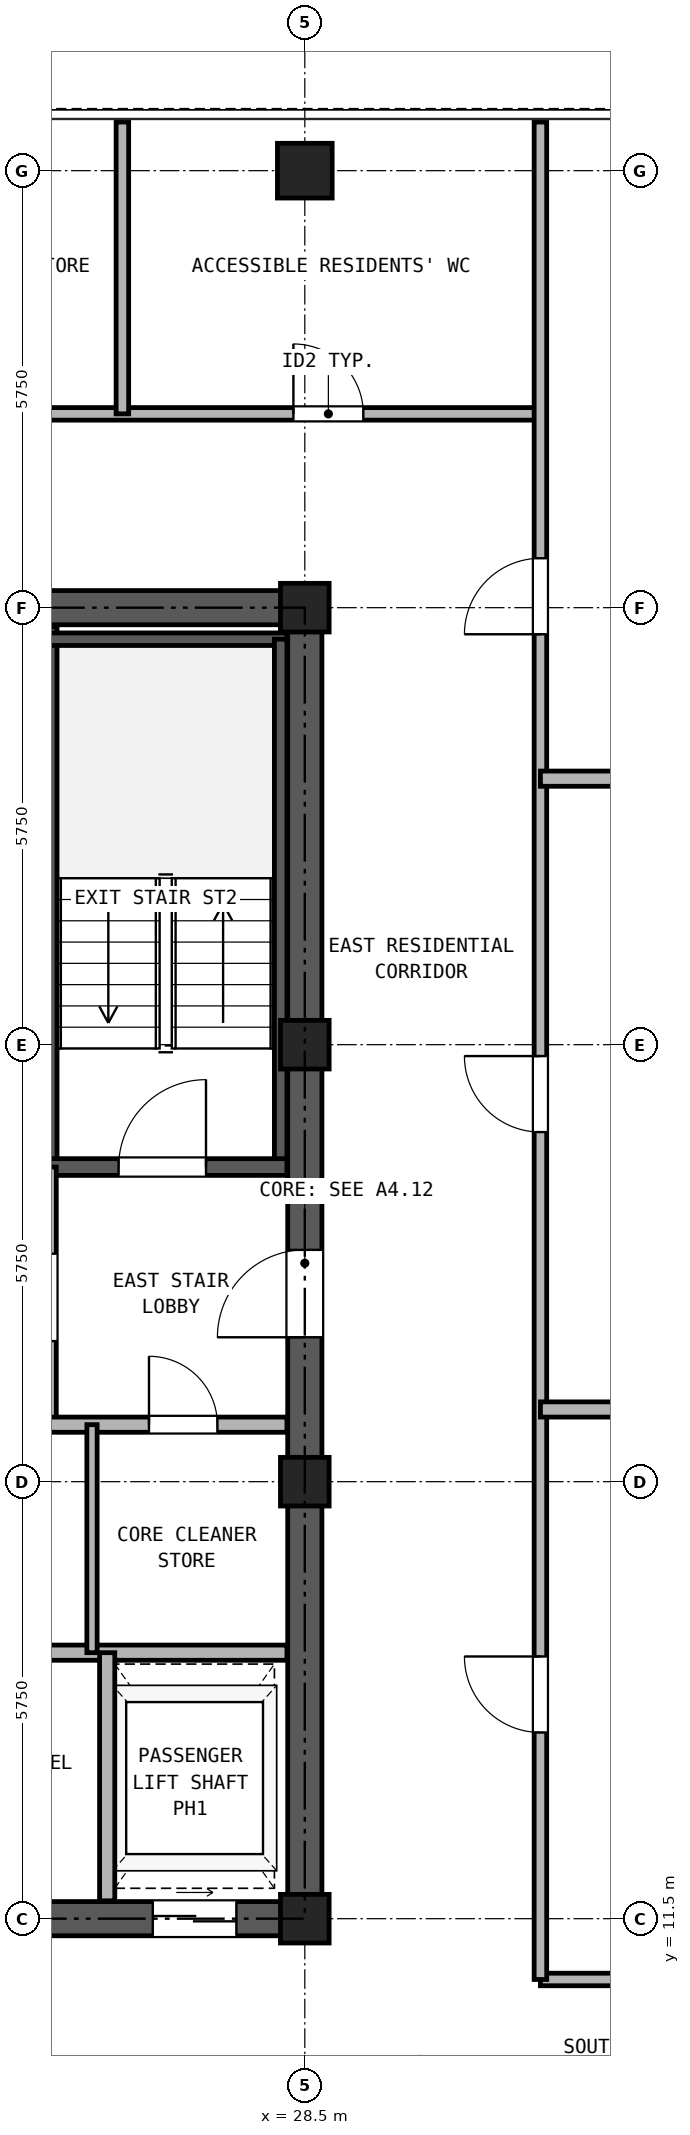
"""IFC4 building model, lengths in metres.
Left out: names, types, materials, properties, quantities, classifications, styles, units other than length and angle.
Written with IfcOpenShell. Run it as: python <this file> out.ifc"""

import sys

from ifc_helpers import new_model, si_unit, direction, frame, frame_2d, origin, origin_2d, place, context, subcontext, project, spatial, rectangle, hollow_rectangle, extrude, source, transform, mapped, element, fill, save


model = new_model("IFC4")
c1 = context("Model", 3, precision=1e-05, world=origin(), true_north=direction((0.0, 1.0)))
c2 = subcontext(c1, "Body", "Model", "MODEL_VIEW")
j1 = project(units=[si_unit("LENGTHUNIT", "METRE"), si_unit("PLANEANGLEUNIT", "RADIAN")], contexts=[c1])
p1 = place(None, origin())
s1 = spatial("IfcSite", under=j1, at=p1, CompositionType="ELEMENT")
p2 = place(p1, origin())
s2 = spatial("IfcBuilding", under=s1, at=p2, CompositionType="ELEMENT")
p3 = place(p2, frame((0.0, 0.0, 175.3)))
s3 = spatial("IfcBuildingStorey", under=s2, at=p3, CompositionType="ELEMENT", Elevation=175.3)
m1 = source(origin(), c2, "Body", "SweptSolid", [
    extrude(hollow_rectangle(XDim=0.72, YDim=0.72, WallThickness=0.04, at=origin_2d()), origin(), (0.0, 0.0, 1.0), 2.95),
])
p4 = place(p3, frame((28.5, 34.5, 0.0), z_axis=(0.0, 0.0, 1.0), x_axis=(1.0, 0.0, 0.0)))
e1 = element("IfcColumn", 1, at=p4, inside=s3, PredefinedType="COLUMN", context=c2, shape_type="MappedRepresentation", body=[
    mapped(m1, transform((0.0, 0.0, 0.0), x_axis=(1.0, 0.0, 0.0), y_axis=(0.0, 1.0, 0.0), z_axis=(0.0, 0.0, 1.0), scale=1.0)),
])
m2 = source(origin(), c2, "Body", "SweptSolid", [
    extrude(hollow_rectangle(XDim=0.64, YDim=0.64, WallThickness=0.035, at=origin_2d()), origin(), (0.0, 0.0, 1.0), 2.95),
])
for number, where, z_axis, x_axis in (
    (2, (28.5, 11.5, 0.0), (0.0, 0.0, 1.0), (1.0, 0.0, 0.0)),
    (3, (28.5, 17.25, 0.0), (0.0, 0.0, 1.0), (1.0, 0.0, 0.0)),
    (4, (28.5, 23.0, 0.0), (0.0, 0.0, 1.0), (1.0, 0.0, 0.0)),
    (5, (28.5, 28.75, 0.0), (0.0, 0.0, 1.0), (1.0, 0.0, 0.0)),
):
    element("IfcColumn", number, at=place(p3, frame(where, z_axis=z_axis, x_axis=x_axis)), inside=s3, PredefinedType="COLUMN", context=c2, shape_type="MappedRepresentation", body=[
        mapped(m2, transform((0.0, 0.0, 0.0), x_axis=(1.0, 0.0, 0.0), y_axis=(0.0, 1.0, 0.0), z_axis=(0.0, 0.0, 1.0), scale=1.0)),
    ])
p5 = place(p3, frame((18.275, 11.5, 0.0), z_axis=(0.0, 0.0, 1.0), x_axis=(1.0, 0.0, 0.0)))
e6 = element("IfcWall", 6, at=p5, inside=s3, PredefinedType="SHEAR", context=c2, shape_type="SweptSolid", body=[
    extrude(rectangle(XDim=10.45, YDim=0.45, at=frame_2d((5.225, 0.0))), origin(), (0.0, 0.0, 1.0), 2.95),
])
p6 = place(p5, frame((1.825, 0.0, 0.0)))
e7 = element("IfcOpeningElement", 7, at=p6, cuts=e6, PredefinedType="OPENING", context=c2, shape_type="SweptSolid", body=[
    extrude(rectangle(XDim=0.95, YDim=2.15, at=frame_2d((0.475, 1.075))), frame((0.0, 0.235, 0.0), z_axis=(0.0, -1.0, 0.0), x_axis=(1.0, 0.0, 0.0)), (0.0, 0.0, 1.0), 0.47),
])
p7 = place(p5, frame((5.325, 0.0, 0.0)))
e8 = element("IfcOpeningElement", 8, at=p7, cuts=e6, PredefinedType="OPENING", context=c2, shape_type="SweptSolid", body=[
    extrude(rectangle(XDim=0.95, YDim=2.15, at=frame_2d((0.475, 1.075))), frame((0.0, 0.235, 0.0), z_axis=(0.0, -1.0, 0.0), x_axis=(1.0, 0.0, 0.0)), (0.0, 0.0, 1.0), 0.47),
])
p8 = place(p5, frame((8.225, 0.0, 0.0)))
e9 = element("IfcOpeningElement", 9, at=p8, cuts=e6, PredefinedType="OPENING", context=c2, shape_type="SweptSolid", body=[
    extrude(rectangle(XDim=1.1, YDim=2.25, at=frame_2d((0.55, 1.125))), frame((0.0, 0.235, 0.0), z_axis=(0.0, -1.0, 0.0), x_axis=(1.0, 0.0, 0.0)), (0.0, 0.0, 1.0), 0.47),
])
p9 = place(p3, frame((18.275, 28.75, 0.0), z_axis=(0.0, 0.0, 1.0), x_axis=(1.0, 0.0, 0.0)))
e10 = element("IfcWall", 10, at=p9, inside=s3, PredefinedType="SHEAR", context=c2, shape_type="SweptSolid", body=[
    extrude(rectangle(XDim=10.45, YDim=0.45, at=frame_2d((5.225, 0.0))), origin(), (0.0, 0.0, 1.0), 2.95),
])
p10 = place(p9, frame((4.105, 0.0, 0.0)))
e11 = element("IfcOpeningElement", 11, at=p10, cuts=e10, PredefinedType="OPENING", context=c2, shape_type="SweptSolid", body=[
    extrude(rectangle(XDim=0.9, YDim=2.05, at=frame_2d((0.45, 1.025))), frame((0.0, 0.235, 0.0), z_axis=(0.0, -1.0, 0.0), x_axis=(1.0, 0.0, 0.0)), (0.0, 0.0, 1.0), 0.47),
])
p11 = place(p9, frame((5.645, 0.0, 0.0)))
e12 = element("IfcOpeningElement", 12, at=p11, cuts=e10, PredefinedType="OPENING", context=c2, shape_type="SweptSolid", body=[
    extrude(rectangle(XDim=0.9, YDim=2.05, at=frame_2d((0.45, 1.025))), frame((0.0, 0.235, 0.0), z_axis=(0.0, -1.0, 0.0), x_axis=(1.0, 0.0, 0.0)), (0.0, 0.0, 1.0), 0.47),
])
p12 = place(p3, frame((28.5, 11.725, 0.0), z_axis=(0.0, 0.0, 1.0), x_axis=(0.0, 1.0, 0.0)))
e13 = element("IfcWall", 13, at=p12, inside=s3, PredefinedType="SHEAR", context=c2, shape_type="SweptSolid", body=[
    extrude(rectangle(XDim=16.8, YDim=0.45, at=frame_2d((8.4, 0.0))), origin(), (0.0, 0.0, 1.0), 2.95),
])
p13 = place(p12, frame((7.425, 0.0, 0.0)))
e14 = element("IfcOpeningElement", 14, at=p13, cuts=e13, PredefinedType="OPENING", context=c2, shape_type="SweptSolid", body=[
    extrude(rectangle(XDim=1.15, YDim=2.2, at=frame_2d((0.575, 1.1))), frame((0.0, 0.235, 0.0), z_axis=(0.0, -1.0, 0.0), x_axis=(1.0, 0.0, 0.0)), (0.0, 0.0, 1.0), 0.47),
])
p14 = place(p3, frame((25.13, 21.39, 0.0), z_axis=(0.0, 0.0, 1.0), x_axis=(0.0, 1.0, 0.0)))
e15 = element("IfcWall", 15, at=p14, inside=s3, PredefinedType="SOLIDWALL", context=c2, shape_type="SweptSolid", body=[
    extrude(rectangle(XDim=7.11, YDim=0.22, at=frame_2d((3.555, 0.0))), origin(), (0.0, 0.0, 1.0), 2.95),
])
p15 = place(p3, frame((25.13, 28.335, 0.0), z_axis=(0.0, 0.0, 1.0), x_axis=(1.0, 0.0, 0.0)))
e16 = element("IfcWall", 16, at=p15, inside=s3, PredefinedType="PARTITIONING", context=c2, shape_type="SweptSolid", body=[
    extrude(rectangle(XDim=3.135, YDim=0.165, at=frame_2d((1.567, 0.0))), origin(), (0.0, 0.0, 1.0), 2.95),
])
p16 = place(p3, frame((28.183, 21.39, 0.0), z_axis=(0.0, 0.0, 1.0), x_axis=(0.0, 1.0, 0.0)))
e17 = element("IfcWall", 17, at=p16, inside=s3, PredefinedType="PARTITIONING", context=c2, shape_type="SweptSolid", body=[
    extrude(rectangle(XDim=6.945, YDim=0.165, at=frame_2d((3.473, 0.0))), origin(), (0.0, 0.0, 1.0), 2.95),
])
p17 = place(p3, frame((25.13, 21.39, 0.0), z_axis=(0.0, 0.0, 1.0), x_axis=(1.0, 0.0, 0.0)))
e18 = element("IfcWall", 18, at=p17, inside=s3, PredefinedType="SOLIDWALL", context=c2, shape_type="SweptSolid", body=[
    extrude(rectangle(XDim=3.135, YDim=0.22, at=frame_2d((1.567, 0.0))), origin(), (0.0, 0.0, 1.0), 2.95),
])
p18 = place(p17, frame((0.92, 0.0, 0.0)))
e19 = element("IfcOpeningElement", 19, at=p18, cuts=e18, PredefinedType="OPENING", context=c2, shape_type="SweptSolid", body=[
    extrude(rectangle(XDim=1.15, YDim=2.2, at=frame_2d((0.575, 1.1))), frame((0.0, 0.12, 0.0), z_axis=(0.0, -1.0, 0.0), x_axis=(1.0, 0.0, 0.0)), (0.0, 0.0, 1.0), 0.24),
])
p19 = place(p3, frame((25.13, 18.0, 0.0), z_axis=(0.0, 0.0, 1.0), x_axis=(0.0, 1.0, 0.0)))
e20 = element("IfcWall", 20, at=p19, inside=s3, PredefinedType="PARTITIONING", context=c2, shape_type="SweptSolid", body=[
    extrude(rectangle(XDim=3.39, YDim=0.2, at=frame_2d((1.695, 0.0))), origin(), (0.0, 0.0, 1.0), 2.95),
])
p20 = place(p19, frame((1.1, 0.0, 0.0)))
e21 = element("IfcOpeningElement", 21, at=p20, cuts=e20, PredefinedType="OPENING", context=c2, shape_type="SweptSolid", body=[
    extrude(rectangle(XDim=1.15, YDim=2.2, at=frame_2d((0.575, 1.1))), frame((0.0, 0.11, 0.0), z_axis=(0.0, -1.0, 0.0), x_axis=(1.0, 0.0, 0.0)), (0.0, 0.0, 1.0), 0.22),
])
p21 = place(p3, frame((18.735, 18.0, 0.0), z_axis=(0.0, 0.0, 1.0), x_axis=(1.0, 0.0, 0.0)))
e22 = element("IfcWall", 22, at=p21, inside=s3, PredefinedType="PARTITIONING", context=c2, shape_type="SweptSolid", body=[
    extrude(rectangle(XDim=9.53, YDim=0.2, at=frame_2d((4.765, 0.0))), origin(), (0.0, 0.0, 1.0), 2.95),
])
p22 = place(p21, frame((0.515, 0.0, 0.0)))
e23 = element("IfcOpeningElement", 23, at=p22, cuts=e22, PredefinedType="OPENING", context=c2, shape_type="SweptSolid", body=[
    extrude(rectangle(XDim=1.3, YDim=2.3, at=frame_2d((0.65, 1.15))), frame((0.0, 0.11, 0.0), z_axis=(0.0, -1.0, 0.0), x_axis=(1.0, 0.0, 0.0)), (0.0, 0.0, 1.0), 0.22),
])
p23 = place(p21, frame((2.615, 0.0, 0.0)))
e24 = element("IfcOpeningElement", 24, at=p23, cuts=e22, PredefinedType="OPENING", context=c2, shape_type="SweptSolid", body=[
    extrude(rectangle(XDim=1.3, YDim=2.3, at=frame_2d((0.65, 1.15))), frame((0.0, 0.11, 0.0), z_axis=(0.0, -1.0, 0.0), x_axis=(1.0, 0.0, 0.0)), (0.0, 0.0, 1.0), 0.22),
])
p24 = place(p21, frame((5.015, 0.0, 0.0)))
e25 = element("IfcOpeningElement", 25, at=p24, cuts=e22, PredefinedType="OPENING", context=c2, shape_type="SweptSolid", body=[
    extrude(rectangle(XDim=0.9, YDim=2.05, at=frame_2d((0.45, 1.025))), frame((0.0, 0.11, 0.0), z_axis=(0.0, -1.0, 0.0), x_axis=(1.0, 0.0, 0.0)), (0.0, 0.0, 1.0), 0.22),
])
p25 = place(p21, frame((7.715, 0.0, 0.0)))
e26 = element("IfcOpeningElement", 26, at=p25, cuts=e22, PredefinedType="OPENING", context=c2, shape_type="SweptSolid", body=[
    extrude(rectangle(XDim=0.9, YDim=2.05, at=frame_2d((0.45, 1.025))), frame((0.0, 0.11, 0.0), z_axis=(0.0, -1.0, 0.0), x_axis=(1.0, 0.0, 0.0)), (0.0, 0.0, 1.0), 0.22),
])
p26 = place(p3, frame((18.735, 15.0, 0.0), z_axis=(0.0, 0.0, 1.0), x_axis=(1.0, 0.0, 0.0)))
e27 = element("IfcWall", 27, at=p26, inside=s3, PredefinedType="PARTITIONING", context=c2, shape_type="SweptSolid", body=[
    extrude(rectangle(XDim=9.53, YDim=0.2, at=frame_2d((4.765, 0.0))), origin(), (0.0, 0.0, 1.0), 2.95),
])
p27 = place(p3, frame((25.7, 15.0, 0.0), z_axis=(0.0, 0.0, 1.0), x_axis=(0.0, 1.0, 0.0)))
e28 = element("IfcWall", 28, at=p27, inside=s3, PredefinedType="PARTITIONING", context=c2, shape_type="SweptSolid", body=[
    extrude(rectangle(XDim=3.0, YDim=0.135, at=frame_2d((1.5, 0.0))), origin(), (0.0, 0.0, 1.0), 2.95),
])
p28 = place(p3, frame((25.9, 11.735, 0.0), z_axis=(0.0, 0.0, 1.0), x_axis=(0.0, 1.0, 0.0)))
e29 = element("IfcWall", 29, at=p28, inside=s3, PredefinedType="PARTITIONING", context=c2, shape_type="SweptSolid", body=[
    extrude(rectangle(XDim=3.265, YDim=0.2, at=frame_2d((1.632, 0.0))), origin(), (0.0, 0.0, 1.0), 2.95),
])
p29 = place(p3, frame((31.6, 10.7, 0.0), z_axis=(0.0, 0.0, 1.0), x_axis=(1.0, 0.0, 0.0)))
e30 = element("IfcWall", 30, at=p29, inside=s3, PredefinedType="PARTITIONING", context=c2, shape_type="SweptSolid", body=[
    extrude(rectangle(XDim=6.6, YDim=0.165, at=frame_2d((3.3, 0.0))), origin(), (0.0, 0.0, 1.0), 2.95),
])
p30 = place(p3, frame((15.4, 31.3, 0.0), z_axis=(0.0, 0.0, 1.0), x_axis=(1.0, 0.0, 0.0)))
e31 = element("IfcWall", 31, at=p30, inside=s3, PredefinedType="PARTITIONING", context=c2, shape_type="SweptSolid", body=[
    extrude(rectangle(XDim=16.2, YDim=0.165, at=frame_2d((8.1, 0.0))), origin(), (0.0, 0.0, 1.0), 2.95),
])
p31 = place(p30, frame((2.8, 0.0, 0.0)))
e32 = element("IfcOpeningElement", 32, at=p31, cuts=e31, PredefinedType="OPENING", context=c2, shape_type="SweptSolid", body=[
    extrude(rectangle(XDim=0.95, YDim=2.15, at=frame_2d((0.475, 1.075))), frame((0.0, 0.093, 0.0), z_axis=(0.0, -1.0, 0.0), x_axis=(1.0, 0.0, 0.0)), (0.0, 0.0, 1.0), 0.185),
])
p32 = place(p30, frame((8.15, 0.0, 0.0)))
e33 = element("IfcOpeningElement", 33, at=p32, cuts=e31, PredefinedType="OPENING", context=c2, shape_type="SweptSolid", body=[
    extrude(rectangle(XDim=0.95, YDim=2.15, at=frame_2d((0.475, 1.075))), frame((0.0, 0.093, 0.0), z_axis=(0.0, -1.0, 0.0), x_axis=(1.0, 0.0, 0.0)), (0.0, 0.0, 1.0), 0.185),
])
p33 = place(p30, frame((12.95, 0.0, 0.0)))
e34 = element("IfcOpeningElement", 34, at=p33, cuts=e31, PredefinedType="OPENING", context=c2, shape_type="SweptSolid", body=[
    extrude(rectangle(XDim=0.92, YDim=2.1, at=frame_2d((0.46, 1.05))), frame((0.0, 0.093, 0.0), z_axis=(0.0, -1.0, 0.0), x_axis=(1.0, 0.0, 0.0)), (0.0, 0.0, 1.0), 0.185),
])
p34 = place(p3, frame((31.6, 10.7, 0.0), z_axis=(0.0, 0.0, 1.0), x_axis=(0.0, 1.0, 0.0)))
e35 = element("IfcWall", 35, at=p34, inside=s3, PredefinedType="PARTITIONING", context=c2, shape_type="SweptSolid", body=[
    extrude(rectangle(XDim=24.44, YDim=0.165, at=frame_2d((12.22, 0.0))), origin(), (0.0, 0.0, 1.0), 2.95),
])
p35 = place(p34, frame((3.25, 0.0, 0.0)))
e36 = element("IfcOpeningElement", 36, at=p35, cuts=e35, PredefinedType="OPENING", context=c2, shape_type="SweptSolid", body=[
    extrude(rectangle(XDim=1.0, YDim=2.15, at=frame_2d((0.5, 1.075))), frame((0.0, 0.093, 0.0), z_axis=(0.0, -1.0, 0.0), x_axis=(1.0, 0.0, 0.0)), (0.0, 0.0, 1.0), 0.185),
])
p36 = place(p34, frame((11.15, 0.0, 0.0)))
e37 = element("IfcOpeningElement", 37, at=p36, cuts=e35, PredefinedType="OPENING", context=c2, shape_type="SweptSolid", body=[
    extrude(rectangle(XDim=1.0, YDim=2.15, at=frame_2d((0.5, 1.075))), frame((0.0, 0.093, 0.0), z_axis=(0.0, -1.0, 0.0), x_axis=(1.0, 0.0, 0.0)), (0.0, 0.0, 1.0), 0.185),
])
p37 = place(p34, frame((17.7, 0.0, 0.0)))
e38 = element("IfcOpeningElement", 38, at=p37, cuts=e35, PredefinedType="OPENING", context=c2, shape_type="SweptSolid", body=[
    extrude(rectangle(XDim=1.0, YDim=2.15, at=frame_2d((0.5, 1.075))), frame((0.0, 0.093, 0.0), z_axis=(0.0, -1.0, 0.0), x_axis=(1.0, 0.0, 0.0)), (0.0, 0.0, 1.0), 0.185),
])
for number, where, z_axis, x_axis in (
    (39, (31.6, 18.2, 0.0), (0.0, 0.0, 1.0), (1.0, 0.0, 0.0)),
    (40, (31.6, 26.5, 0.0), (0.0, 0.0, 1.0), (1.0, 0.0, 0.0)),
):
    element("IfcWall", number, at=place(p3, frame(where, z_axis=z_axis, x_axis=x_axis)), inside=s3, PredefinedType="PARTITIONING", context=c2, shape_type="SweptSolid", body=[
        extrude(rectangle(XDim=10.04, YDim=0.2, at=frame_2d((5.02, 0.0))), origin(), (0.0, 0.0, 1.0), 2.95),
    ])
p38 = place(p3, frame((26.1, 31.3, 0.0), z_axis=(0.0, 0.0, 1.0), x_axis=(0.0, 1.0, 0.0)))
e41 = element("IfcWall", 41, at=p38, inside=s3, PredefinedType="PARTITIONING", context=c2, shape_type="SweptSolid", body=[
    extrude(rectangle(XDim=3.84, YDim=0.165, at=frame_2d((1.92, 0.0))), origin(), (0.0, 0.0, 1.0), 2.95),
])
p39 = place(p18, frame((1.15, 0.0, 0.0), z_axis=(0.0, 0.0, 1.0), x_axis=(-1.0, 0.0, 0.0)))
e42 = element("IfcDoor", 42, at=p39, inside=s3, OperationType="SINGLE_SWING_RIGHT", PredefinedType="DOOR", context=c2, shape_type="SweptSolid", body=[
    extrude(rectangle(XDim=1.15, YDim=2.2, at=frame_2d((0.575, 1.1))), frame((0.0, 0.025, 0.0), z_axis=(0.0, -1.0, 0.0), x_axis=(1.0, 0.0, 0.0)), (0.0, 0.0, 1.0), 0.05),
])
fill(e19, e42)
p40 = place(p25, frame((0.9, 0.0, 0.0), z_axis=(0.0, 0.0, 1.0), x_axis=(-1.0, 0.0, 0.0)))
e43 = element("IfcDoor", 43, at=p40, inside=s3, OperationType="SINGLE_SWING_LEFT", PredefinedType="DOOR", context=c2, shape_type="SweptSolid", body=[
    extrude(rectangle(XDim=0.9, YDim=2.05, at=frame_2d((0.45, 1.025))), frame((0.0, 0.025, 0.0), z_axis=(0.0, -1.0, 0.0), x_axis=(1.0, 0.0, 0.0)), (0.0, 0.0, 1.0), 0.05),
])
fill(e26, e43)
p41 = place(p13, origin())
e44 = element("IfcDoor", 44, at=p41, inside=s3, OperationType="SINGLE_SWING_LEFT", PredefinedType="DOOR", context=c2, shape_type="SweptSolid", body=[
    extrude(rectangle(XDim=1.15, YDim=2.2, at=frame_2d((0.575, 1.1))), frame((0.0, 0.025, 0.0), z_axis=(0.0, -1.0, 0.0), x_axis=(1.0, 0.0, 0.0)), (0.0, 0.0, 1.0), 0.05),
])
fill(e14, e44)
p42 = place(p8, frame((1.1, 0.0, 0.0), z_axis=(0.0, 0.0, 1.0), x_axis=(-1.0, 0.0, 0.0)))
e45 = element("IfcDoor", 45, at=p42, inside=s3, OperationType="DOUBLE_DOOR_SLIDING", PredefinedType="DOOR", context=c2, shape_type="SweptSolid", body=[
    extrude(rectangle(XDim=1.1, YDim=2.25, at=frame_2d((0.55, 1.125))), frame((0.0, 0.025, 0.0), z_axis=(0.0, -1.0, 0.0), x_axis=(1.0, 0.0, 0.0)), (0.0, 0.0, 1.0), 0.05),
])
fill(e9, e45)
p43 = place(p35, frame((1.0, 0.0, 0.0), z_axis=(0.0, 0.0, 1.0), x_axis=(-1.0, 0.0, 0.0)))
e46 = element("IfcDoor", 46, at=p43, inside=s3, OperationType="SINGLE_SWING_RIGHT", PredefinedType="DOOR", context=c2, shape_type="SweptSolid", body=[
    extrude(rectangle(XDim=1.0, YDim=2.15, at=frame_2d((0.5, 1.075))), frame((0.0, 0.025, 0.0), z_axis=(0.0, -1.0, 0.0), x_axis=(1.0, 0.0, 0.0)), (0.0, 0.0, 1.0), 0.05),
])
fill(e36, e46)
p44 = place(p36, frame((1.0, 0.0, 0.0), z_axis=(0.0, 0.0, 1.0), x_axis=(-1.0, 0.0, 0.0)))
e47 = element("IfcDoor", 47, at=p44, inside=s3, OperationType="SINGLE_SWING_RIGHT", PredefinedType="DOOR", context=c2, shape_type="SweptSolid", body=[
    extrude(rectangle(XDim=1.0, YDim=2.15, at=frame_2d((0.5, 1.075))), frame((0.0, 0.025, 0.0), z_axis=(0.0, -1.0, 0.0), x_axis=(1.0, 0.0, 0.0)), (0.0, 0.0, 1.0), 0.05),
])
fill(e37, e47)
p45 = place(p37, frame((1.0, 0.0, 0.0), z_axis=(0.0, 0.0, 1.0), x_axis=(-1.0, 0.0, 0.0)))
e48 = element("IfcDoor", 48, at=p45, inside=s3, OperationType="SINGLE_SWING_LEFT", PredefinedType="DOOR", context=c2, shape_type="SweptSolid", body=[
    extrude(rectangle(XDim=1.0, YDim=2.15, at=frame_2d((0.5, 1.075))), frame((0.0, 0.025, 0.0), z_axis=(0.0, -1.0, 0.0), x_axis=(1.0, 0.0, 0.0)), (0.0, 0.0, 1.0), 0.05),
])
fill(e38, e48)
p46 = place(p33, origin())
e49 = element("IfcDoor", 49, at=p46, inside=s3, OperationType="SINGLE_SWING_LEFT", PredefinedType="DOOR", context=c2, shape_type="SweptSolid", body=[
    extrude(rectangle(XDim=0.92, YDim=2.1, at=frame_2d((0.46, 1.05))), frame((0.0, 0.025, 0.0), z_axis=(0.0, -1.0, 0.0), x_axis=(1.0, 0.0, 0.0)), (0.0, 0.0, 1.0), 0.05),
])
fill(e34, e49)
save(model, sys.argv[1])
